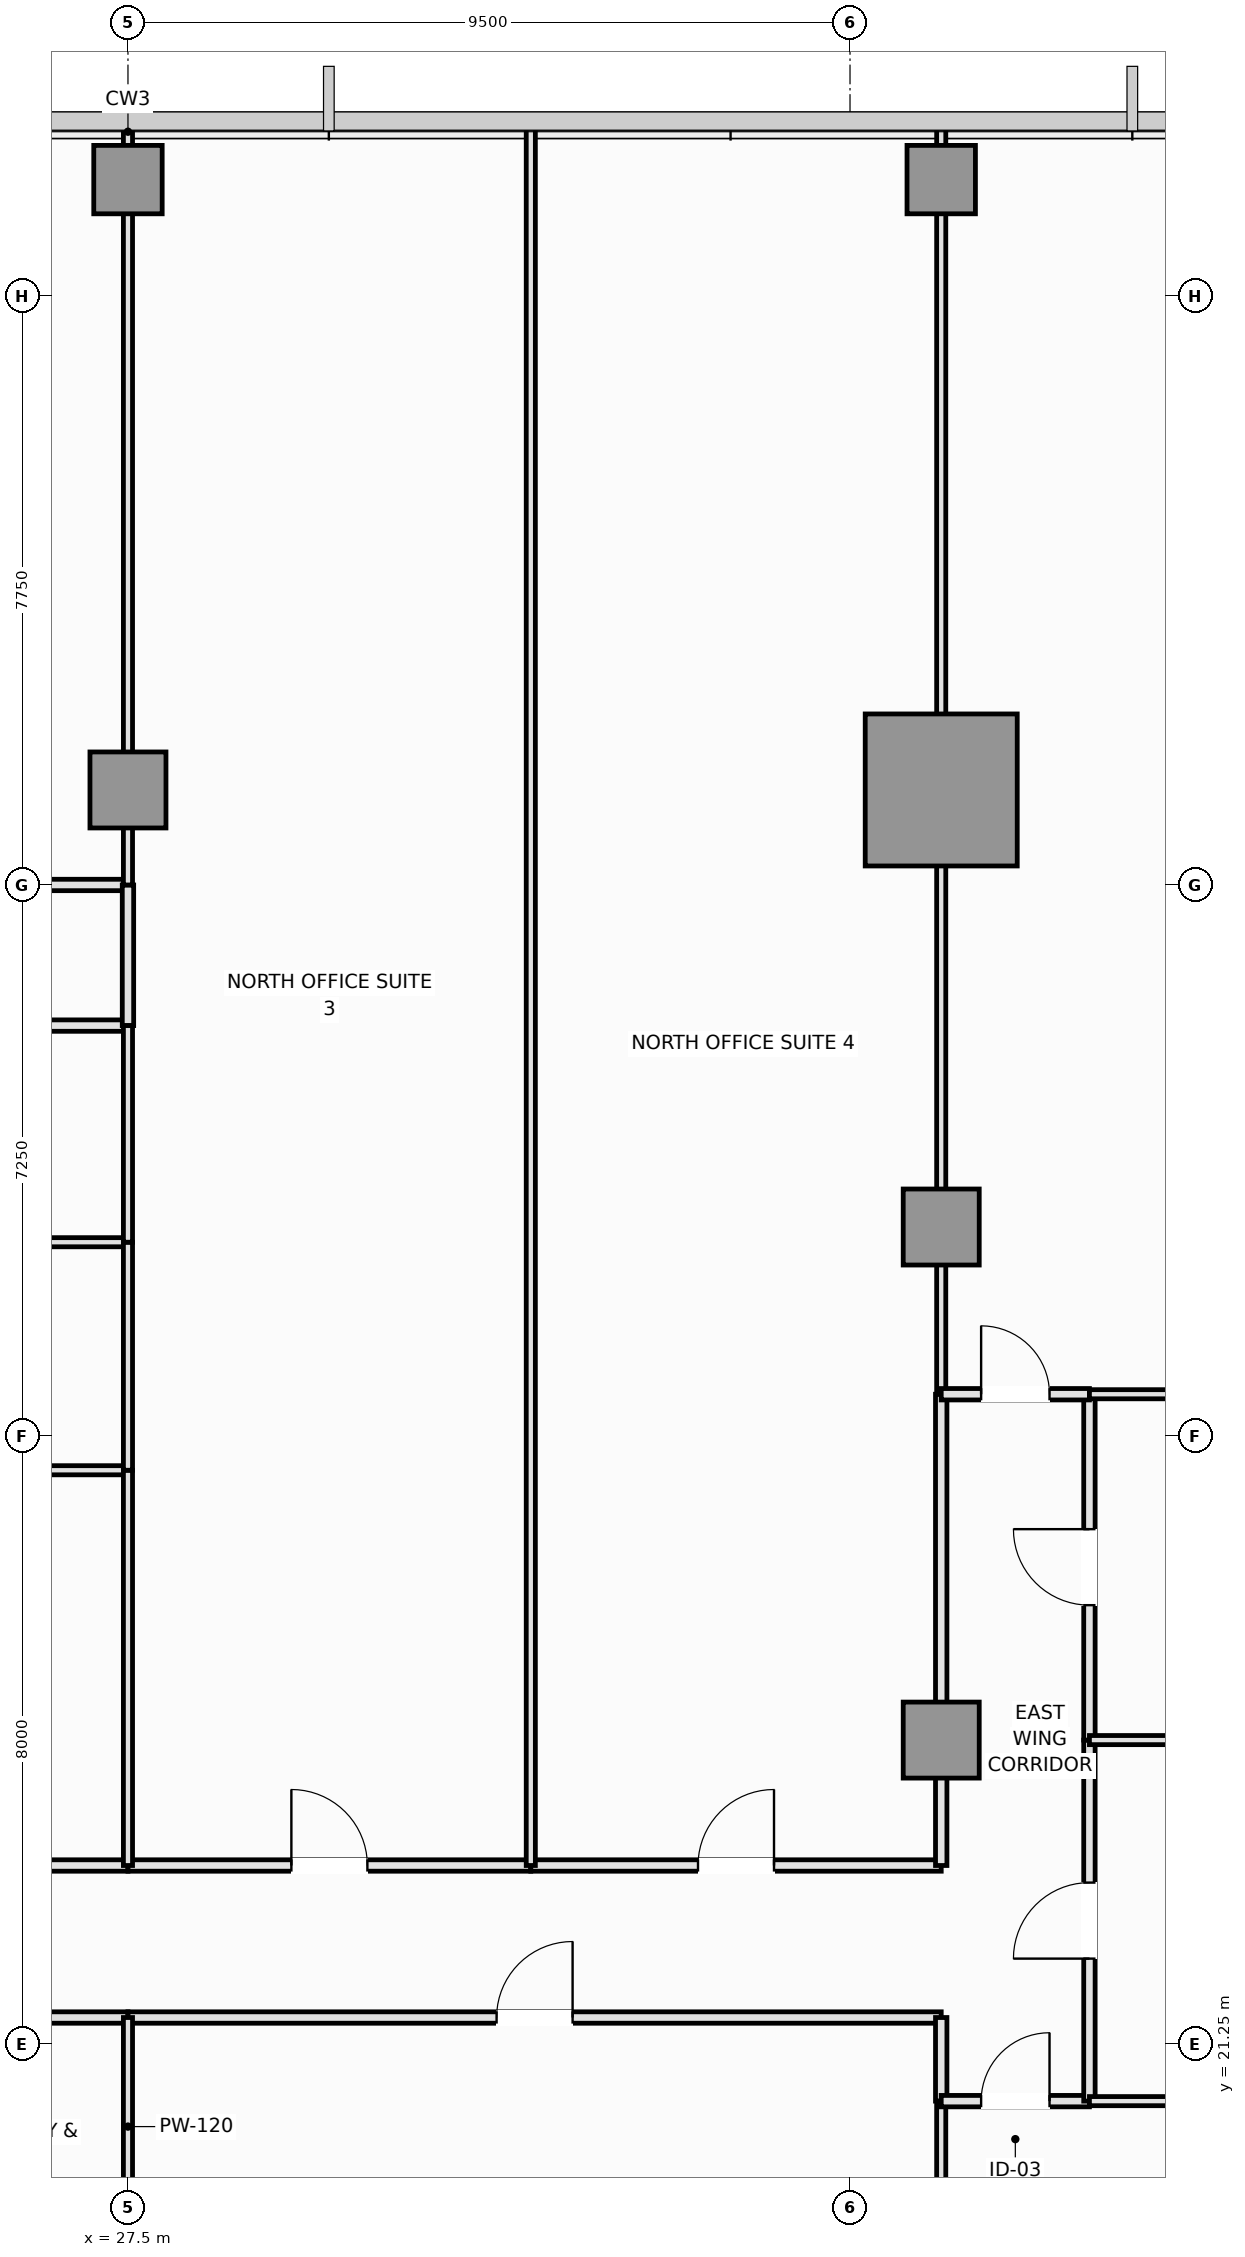
"""IFC4 building model, lengths in metres.
Left out: names, types, materials, properties, quantities, classifications, styles, units other than length and angle.
Written with IfcOpenShell. Run it as: python <this file> out.ifc"""

import sys

from ifc_helpers import new_model, si_unit, direction, frame, frame_2d, origin, origin_2d, place, context, subcontext, project, spatial, rectangle, extrude, element, fill, save


model = new_model("IFC4")
c1 = context("Model", 3, precision=1e-05, world=origin(), true_north=direction((0.0, 1.0)))
c2 = subcontext(c1, "Body", "Model", "MODEL_VIEW")
j1 = project(units=[si_unit("LENGTHUNIT", "METRE"), si_unit("PLANEANGLEUNIT", "RADIAN")], contexts=[c1])
p1 = place(None, origin())
s1 = spatial("IfcSite", under=j1, at=p1, CompositionType="ELEMENT")
p2 = place(p1, origin())
s2 = spatial("IfcBuilding", under=s1, at=p2, CompositionType="ELEMENT")
p3 = place(p2, frame((0.0, 0.0, 169.7)))
s3 = spatial("IfcBuildingStorey", under=s2, at=p3, CompositionType="ELEMENT", Elevation=169.7)
p4 = place(p3, frame((38.2, 37.75, 0.0), z_axis=(0.0, 0.0, 1.0), x_axis=(1.0, 0.0, 0.0)))
e1 = element("IfcColumn", 1, at=p4, inside=s3, PredefinedType="COLUMN", context=c2, shape_type="SweptSolid", body=[
    extrude(rectangle(XDim=2.0, YDim=2.0, at=origin_2d()), origin(), (0.0, 0.0, 1.0), 3.55),
])
for number, where, z_axis, x_axis in (
    (2, (27.5, 37.75, 0.0), (0.0, 0.0, 1.0), (1.0, 0.0, 0.0)),
    (3, (38.2, 25.25, 0.0), (0.0, 0.0, 1.0), (1.0, 0.0, 0.0)),
    (4, (38.2, 32.0, 0.0), (0.0, 0.0, 1.0), (1.0, 0.0, 0.0)),
):
    element("IfcColumn", number, at=place(p3, frame(where, z_axis=z_axis, x_axis=x_axis)), inside=s3, PredefinedType="COLUMN", context=c2, shape_type="SweptSolid", body=[
        extrude(rectangle(XDim=1.0, YDim=1.0, at=origin_2d()), origin(), (0.0, 0.0, 1.0), 3.55),
    ])
for number, where, z_axis, x_axis in (
    (5, (27.5, 45.78, 0.0), (0.0, 0.0, 1.0), (1.0, 0.0, 0.0)),
    (6, (38.2, 45.78, 0.0), (0.0, 0.0, 1.0), (1.0, 0.0, 0.0)),
):
    element("IfcColumn", number, at=place(p3, frame(where, z_axis=z_axis, x_axis=x_axis)), inside=s3, PredefinedType="COLUMN", context=c2, shape_type="SweptSolid", body=[
        extrude(rectangle(XDim=0.9, YDim=0.9, at=origin_2d()), origin(), (0.0, 0.0, 1.0), 3.55),
    ])
p5 = place(p3, frame((23.6, 21.6, 0.0), z_axis=(0.0, 0.0, 1.0), x_axis=(1.0, 0.0, 0.0)))
e7 = element("IfcWall", 7, at=p5, inside=s3, PredefinedType="PARTITIONING", context=c2, shape_type="SweptSolid", body=[
    extrude(rectangle(XDim=3.9, YDim=0.15, at=frame_2d((1.95, 0.0))), origin(), (0.0, 0.0, 1.0), 3.35),
])
p6 = place(p5, frame((1.45, 0.0, 0.0)))
e8 = element("IfcOpeningElement", 8, at=p6, cuts=e7, PredefinedType="OPENING", context=c2, shape_type="SweptSolid", body=[
    extrude(rectangle(XDim=1.0, YDim=2.15, at=frame_2d((0.5, 1.075))), frame((0.0, 0.085, 0.0), z_axis=(0.0, -1.0, 0.0), x_axis=(1.0, 0.0, 0.0)), (0.0, 0.0, 1.0), 0.17),
])
p7 = place(p3, frame((19.95, 23.6, 0.0), z_axis=(0.0, 0.0, 1.0), x_axis=(1.0, 0.0, 0.0)))
e9 = element("IfcWall", 9, at=p7, inside=s3, PredefinedType="PARTITIONING", context=c2, shape_type="SweptSolid", body=[
    extrude(rectangle(XDim=7.55, YDim=0.15, at=frame_2d((3.775, 0.0))), origin(), (0.0, 0.0, 1.0), 3.35),
])
p8 = place(p3, frame((27.5, 21.6, 0.0), z_axis=(0.0, 0.0, 1.0), x_axis=(1.0, 0.0, 0.0)))
e10 = element("IfcWall", 10, at=p8, inside=s3, PredefinedType="PARTITIONING", context=c2, shape_type="SweptSolid", body=[
    extrude(rectangle(XDim=10.7, YDim=0.15, at=frame_2d((5.35, 0.0))), origin(), (0.0, 0.0, 1.0), 3.35),
])
p9 = place(p8, frame((4.85, 0.0, 0.0)))
e11 = element("IfcOpeningElement", 11, at=p9, cuts=e10, PredefinedType="OPENING", context=c2, shape_type="SweptSolid", body=[
    extrude(rectangle(XDim=1.0, YDim=2.15, at=frame_2d((0.5, 1.075))), frame((0.0, 0.085, 0.0), z_axis=(0.0, -1.0, 0.0), x_axis=(1.0, 0.0, 0.0)), (0.0, 0.0, 1.0), 0.17),
])
p10 = place(p3, frame((27.5, 23.6, 0.0), z_axis=(0.0, 0.0, 1.0), x_axis=(1.0, 0.0, 0.0)))
e12 = element("IfcWall", 12, at=p10, inside=s3, PredefinedType="PARTITIONING", context=c2, shape_type="SweptSolid", body=[
    extrude(rectangle(XDim=5.3, YDim=0.15, at=frame_2d((2.65, 0.0))), origin(), (0.0, 0.0, 1.0), 3.35),
])
p11 = place(p10, frame((2.15, 0.0, 0.0)))
e13 = element("IfcOpeningElement", 13, at=p11, cuts=e12, PredefinedType="OPENING", context=c2, shape_type="SweptSolid", body=[
    extrude(rectangle(XDim=1.0, YDim=2.15, at=frame_2d((0.5, 1.075))), frame((0.0, 0.085, 0.0), z_axis=(0.0, -1.0, 0.0), x_axis=(1.0, 0.0, 0.0)), (0.0, 0.0, 1.0), 0.17),
])
p12 = place(p3, frame((32.8, 23.6, 0.0), z_axis=(0.0, 0.0, 1.0), x_axis=(1.0, 0.0, 0.0)))
e14 = element("IfcWall", 14, at=p12, inside=s3, PredefinedType="PARTITIONING", context=c2, shape_type="SweptSolid", body=[
    extrude(rectangle(XDim=5.4, YDim=0.15, at=frame_2d((2.7, 0.0))), origin(), (0.0, 0.0, 1.0), 3.35),
])
p13 = place(p12, frame((2.2, 0.0, 0.0)))
e15 = element("IfcOpeningElement", 15, at=p13, cuts=e14, PredefinedType="OPENING", context=c2, shape_type="SweptSolid", body=[
    extrude(rectangle(XDim=1.0, YDim=2.15, at=frame_2d((0.5, 1.075))), frame((0.0, 0.085, 0.0), z_axis=(0.0, -1.0, 0.0), x_axis=(1.0, 0.0, 0.0)), (0.0, 0.0, 1.0), 0.17),
])
p14 = place(p3, frame((19.95, 34.65, 0.0), z_axis=(0.0, 0.0, 1.0), x_axis=(1.0, 0.0, 0.0)))
e16 = element("IfcWall", 16, at=p14, inside=s3, PredefinedType="PARTITIONING", context=c2, shape_type="SweptSolid", body=[
    extrude(rectangle(XDim=7.55, YDim=0.15, at=frame_2d((3.775, 0.0))), origin(), (0.0, 0.0, 1.0), 3.35),
])
p15 = place(p3, frame((19.95, 36.5, 0.0), z_axis=(0.0, 0.0, 1.0), x_axis=(1.0, 0.0, 0.0)))
e17 = element("IfcWall", 17, at=p15, inside=s3, PredefinedType="PARTITIONING", context=c2, shape_type="SweptSolid", body=[
    extrude(rectangle(XDim=7.55, YDim=0.15, at=frame_2d((3.775, 0.0))), origin(), (0.0, 0.0, 1.0), 3.35),
])
p16 = place(p15, frame((3.275, 0.0, 0.0)))
e18 = element("IfcOpeningElement", 18, at=p16, cuts=e17, PredefinedType="OPENING", context=c2, shape_type="SweptSolid", body=[
    extrude(rectangle(XDim=1.0, YDim=2.15, at=frame_2d((0.5, 1.075))), frame((0.0, 0.085, 0.0), z_axis=(0.0, -1.0, 0.0), x_axis=(1.0, 0.0, 0.0)), (0.0, 0.0, 1.0), 0.17),
])
p17 = place(p3, frame((27.5, 34.65, 0.0), z_axis=(0.0, 0.0, 1.0), x_axis=(0.0, 1.0, 0.0)))
e19 = element("IfcWall", 19, at=p17, inside=s3, PredefinedType="PARTITIONING", context=c2, shape_type="SweptSolid", body=[
    extrude(rectangle(XDim=1.85, YDim=0.15, at=frame_2d((0.925, 0.0))), origin(), (0.0, 0.0, 1.0), 3.35),
])
p18 = place(p3, frame((27.5, 18.73, 0.0), z_axis=(0.0, 0.0, 1.0), x_axis=(0.0, 1.0, 0.0)))
e20 = element("IfcWall", 20, at=p18, inside=s3, PredefinedType="PARTITIONING", context=c2, shape_type="SweptSolid", body=[
    extrude(rectangle(XDim=2.87, YDim=0.12, at=frame_2d((1.435, 0.0))), origin(), (0.0, 0.0, 1.0), 3.35),
])
p19 = place(p3, frame((19.95, 28.8, 0.0), z_axis=(0.0, 0.0, 1.0), x_axis=(1.0, 0.0, 0.0)))
e21 = element("IfcWall", 21, at=p19, inside=s3, PredefinedType="PARTITIONING", context=c2, shape_type="SweptSolid", body=[
    extrude(rectangle(XDim=7.55, YDim=0.12, at=frame_2d((3.775, 0.0))), origin(), (0.0, 0.0, 1.0), 3.35),
])
p20 = place(p3, frame((27.5, 23.6, 0.0), z_axis=(0.0, 0.0, 1.0), x_axis=(0.0, 1.0, 0.0)))
e22 = element("IfcWall", 22, at=p20, inside=s3, PredefinedType="PARTITIONING", context=c2, shape_type="SweptSolid", body=[
    extrude(rectangle(XDim=5.2, YDim=0.12, at=frame_2d((2.6, 0.0))), origin(), (0.0, 0.0, 1.0), 3.35),
])
p21 = place(p3, frame((19.95, 31.8, 0.0), z_axis=(0.0, 0.0, 1.0), x_axis=(1.0, 0.0, 0.0)))
e23 = element("IfcWall", 23, at=p21, inside=s3, PredefinedType="PARTITIONING", context=c2, shape_type="SweptSolid", body=[
    extrude(rectangle(XDim=7.55, YDim=0.12, at=frame_2d((3.775, 0.0))), origin(), (0.0, 0.0, 1.0), 3.35),
])
p22 = place(p3, frame((27.5, 28.8, 0.0), z_axis=(0.0, 0.0, 1.0), x_axis=(0.0, 1.0, 0.0)))
e24 = element("IfcWall", 24, at=p22, inside=s3, PredefinedType="PARTITIONING", context=c2, shape_type="SweptSolid", body=[
    extrude(rectangle(XDim=3.0, YDim=0.12, at=frame_2d((1.5, 0.0))), origin(), (0.0, 0.0, 1.0), 3.35),
])
p23 = place(p3, frame((27.5, 31.8, 0.0), z_axis=(0.0, 0.0, 1.0), x_axis=(0.0, 1.0, 0.0)))
e25 = element("IfcWall", 25, at=p23, inside=s3, PredefinedType="PARTITIONING", context=c2, shape_type="SweptSolid", body=[
    extrude(rectangle(XDim=2.85, YDim=0.12, at=frame_2d((1.425, 0.0))), origin(), (0.0, 0.0, 1.0), 3.35),
])
p24 = place(p3, frame((38.2, 20.5, 0.0), z_axis=(0.0, 0.0, 1.0), x_axis=(0.0, 1.0, 0.0)))
e26 = element("IfcWall", 26, at=p24, inside=s3, PredefinedType="PARTITIONING", context=c2, shape_type="SweptSolid", body=[
    extrude(rectangle(XDim=1.1, YDim=0.15, at=frame_2d((0.55, 0.0))), origin(), (0.0, 0.0, 1.0), 2.85),
])
p25 = place(p3, frame((38.2, 3.51, 0.0), z_axis=(0.0, 0.0, 1.0), x_axis=(0.0, 1.0, 0.0)))
e27 = element("IfcWall", 27, at=p25, inside=s3, PredefinedType="PARTITIONING", context=c2, shape_type="SweptSolid", body=[
    extrude(rectangle(XDim=16.99, YDim=0.12, at=frame_2d((8.495, 0.0))), origin(), (0.0, 0.0, 1.0), 2.85),
])
p26 = place(p3, frame((27.5, 36.5, 0.0), z_axis=(0.0, 0.0, 1.0), x_axis=(0.0, 1.0, 0.0)))
e28 = element("IfcWall", 28, at=p26, inside=s3, PredefinedType="PARTITIONING", context=c2, shape_type="SweptSolid", body=[
    extrude(rectangle(XDim=9.99, YDim=0.12, at=frame_2d((4.995, 0.0))), origin(), (0.0, 0.0, 1.0), 2.85),
])
p27 = place(p3, frame((32.8, 23.6, 0.0), z_axis=(0.0, 0.0, 1.0), x_axis=(0.0, 1.0, 0.0)))
e29 = element("IfcWall", 29, at=p27, inside=s3, PredefinedType="PARTITIONING", context=c2, shape_type="SweptSolid", body=[
    extrude(rectangle(XDim=22.89, YDim=0.12, at=frame_2d((11.445, 0.0))), origin(), (0.0, 0.0, 1.0), 3.35),
])
p28 = place(p3, frame((38.2, 23.6, 0.0), z_axis=(0.0, 0.0, 1.0), x_axis=(0.0, 1.0, 0.0)))
e30 = element("IfcWall", 30, at=p28, inside=s3, PredefinedType="PARTITIONING", context=c2, shape_type="SweptSolid", body=[
    extrude(rectangle(XDim=6.2, YDim=0.15, at=frame_2d((3.1, 0.0))), origin(), (0.0, 0.0, 1.0), 2.85),
])
p29 = place(p3, frame((38.2, 29.8, 0.0), z_axis=(0.0, 0.0, 1.0), x_axis=(0.0, 1.0, 0.0)))
e31 = element("IfcWall", 31, at=p29, inside=s3, PredefinedType="PARTITIONING", context=c2, shape_type="SweptSolid", body=[
    extrude(rectangle(XDim=16.69, YDim=0.12, at=frame_2d((8.345, 0.0))), origin(), (0.0, 0.0, 1.0), 2.85),
])
p30 = place(p3, frame((38.2, 20.5, 0.0), z_axis=(0.0, 0.0, 1.0), x_axis=(1.0, 0.0, 0.0)))
e32 = element("IfcWall", 32, at=p30, inside=s3, PredefinedType="PARTITIONING", context=c2, shape_type="SweptSolid", body=[
    extrude(rectangle(XDim=1.95, YDim=0.15, at=frame_2d((0.975, 0.0))), origin(), (0.0, 0.0, 1.0), 3.35),
])
p31 = place(p30, frame((0.525, 0.0, 0.0)))
e33 = element("IfcOpeningElement", 33, at=p31, cuts=e32, PredefinedType="OPENING", context=c2, shape_type="SweptSolid", body=[
    extrude(rectangle(XDim=0.9, YDim=2.1, at=frame_2d((0.45, 1.05))), frame((0.0, 0.085, 0.0), z_axis=(0.0, -1.0, 0.0), x_axis=(1.0, 0.0, 0.0)), (0.0, 0.0, 1.0), 0.17),
])
p32 = place(p3, frame((40.15, 20.5, 0.0), z_axis=(0.0, 0.0, 1.0), x_axis=(0.0, 1.0, 0.0)))
e34 = element("IfcWall", 34, at=p32, inside=s3, PredefinedType="PARTITIONING", context=c2, shape_type="SweptSolid", body=[
    extrude(rectangle(XDim=4.75, YDim=0.15, at=frame_2d((2.375, 0.0))), origin(), (0.0, 0.0, 1.0), 3.35),
])
p33 = place(p32, frame((1.875, 0.0, 0.0)))
e35 = element("IfcOpeningElement", 35, at=p33, cuts=e34, PredefinedType="OPENING", context=c2, shape_type="SweptSolid", body=[
    extrude(rectangle(XDim=1.0, YDim=2.15, at=frame_2d((0.5, 1.075))), frame((0.0, 0.085, 0.0), z_axis=(0.0, -1.0, 0.0), x_axis=(1.0, 0.0, 0.0)), (0.0, 0.0, 1.0), 0.17),
])
p34 = place(p3, frame((40.15, 25.25, 0.0), z_axis=(0.0, 0.0, 1.0), x_axis=(0.0, 1.0, 0.0)))
e36 = element("IfcWall", 36, at=p34, inside=s3, PredefinedType="PARTITIONING", context=c2, shape_type="SweptSolid", body=[
    extrude(rectangle(XDim=4.55, YDim=0.15, at=frame_2d((2.275, 0.0))), origin(), (0.0, 0.0, 1.0), 3.35),
])
p35 = place(p34, frame((1.775, 0.0, 0.0)))
e37 = element("IfcOpeningElement", 37, at=p35, cuts=e36, PredefinedType="OPENING", context=c2, shape_type="SweptSolid", body=[
    extrude(rectangle(XDim=1.0, YDim=2.15, at=frame_2d((0.5, 1.075))), frame((0.0, 0.085, 0.0), z_axis=(0.0, -1.0, 0.0), x_axis=(1.0, 0.0, 0.0)), (0.0, 0.0, 1.0), 0.17),
])
p36 = place(p3, frame((38.2, 29.8, 0.0), z_axis=(0.0, 0.0, 1.0), x_axis=(1.0, 0.0, 0.0)))
e38 = element("IfcWall", 38, at=p36, inside=s3, PredefinedType="PARTITIONING", context=c2, shape_type="SweptSolid", body=[
    extrude(rectangle(XDim=1.95, YDim=0.15, at=frame_2d((0.975, 0.0))), origin(), (0.0, 0.0, 1.0), 3.35),
])
p37 = place(p36, frame((0.525, 0.0, 0.0)))
e39 = element("IfcOpeningElement", 39, at=p37, cuts=e38, PredefinedType="OPENING", context=c2, shape_type="SweptSolid", body=[
    extrude(rectangle(XDim=0.9, YDim=2.1, at=frame_2d((0.45, 1.05))), frame((0.0, 0.085, 0.0), z_axis=(0.0, -1.0, 0.0), x_axis=(1.0, 0.0, 0.0)), (0.0, 0.0, 1.0), 0.17),
])
p38 = place(p3, frame((40.15, 20.5, 0.0), z_axis=(0.0, 0.0, 1.0), x_axis=(1.0, 0.0, 0.0)))
e40 = element("IfcWall", 40, at=p38, inside=s3, PredefinedType="PARTITIONING", context=c2, shape_type="SweptSolid", body=[
    extrude(rectangle(XDim=10.34, YDim=0.12, at=frame_2d((5.17, 0.0))), origin(), (0.0, 0.0, 1.0), 3.35),
])
p39 = place(p3, frame((40.15, 25.25, 0.0), z_axis=(0.0, 0.0, 1.0), x_axis=(1.0, 0.0, 0.0)))
e41 = element("IfcWall", 41, at=p39, inside=s3, PredefinedType="PARTITIONING", context=c2, shape_type="SweptSolid", body=[
    extrude(rectangle(XDim=10.34, YDim=0.12, at=frame_2d((5.17, 0.0))), origin(), (0.0, 0.0, 1.0), 2.75),
])
p40 = place(p3, frame((40.15, 29.8, 0.0), z_axis=(0.0, 0.0, 1.0), x_axis=(1.0, 0.0, 0.0)))
e42 = element("IfcWall", 42, at=p40, inside=s3, PredefinedType="PARTITIONING", context=c2, shape_type="SweptSolid", body=[
    extrude(rectangle(XDim=10.34, YDim=0.12, at=frame_2d((5.17, 0.0))), origin(), (0.0, 0.0, 1.0), 3.35),
])
p41 = place(p9, origin())
e43 = element("IfcDoor", 43, at=p41, inside=s3, OperationType="SINGLE_SWING_RIGHT", PredefinedType="DOOR", context=c2, shape_type="SweptSolid", body=[
    extrude(rectangle(XDim=1.0, YDim=2.15, at=frame_2d((0.5, 1.075))), frame((0.0, 0.025, 0.0), z_axis=(0.0, -1.0, 0.0), x_axis=(1.0, 0.0, 0.0)), (0.0, 0.0, 1.0), 0.05),
])
fill(e11, e43)
p42 = place(p11, origin())
e44 = element("IfcDoor", 44, at=p42, inside=s3, OperationType="SINGLE_SWING_LEFT", PredefinedType="DOOR", context=c2, shape_type="SweptSolid", body=[
    extrude(rectangle(XDim=1.0, YDim=2.15, at=frame_2d((0.5, 1.075))), frame((0.0, 0.025, 0.0), z_axis=(0.0, -1.0, 0.0), x_axis=(1.0, 0.0, 0.0)), (0.0, 0.0, 1.0), 0.05),
])
fill(e13, e44)
p43 = place(p13, origin())
e45 = element("IfcDoor", 45, at=p43, inside=s3, OperationType="SINGLE_SWING_RIGHT", PredefinedType="DOOR", context=c2, shape_type="SweptSolid", body=[
    extrude(rectangle(XDim=1.0, YDim=2.15, at=frame_2d((0.5, 1.075))), frame((0.0, 0.025, 0.0), z_axis=(0.0, -1.0, 0.0), x_axis=(1.0, 0.0, 0.0)), (0.0, 0.0, 1.0), 0.05),
])
fill(e15, e45)
p44 = place(p31, origin())
e46 = element("IfcDoor", 46, at=p44, inside=s3, OperationType="SINGLE_SWING_RIGHT", PredefinedType="DOOR", context=c2, shape_type="SweptSolid", body=[
    extrude(rectangle(XDim=0.9, YDim=2.1, at=frame_2d((0.45, 1.05))), frame((0.0, 0.025, 0.0), z_axis=(0.0, -1.0, 0.0), x_axis=(1.0, 0.0, 0.0)), (0.0, 0.0, 1.0), 0.05),
])
fill(e33, e46)
p45 = place(p33, origin())
e47 = element("IfcDoor", 47, at=p45, inside=s3, OperationType="SINGLE_SWING_LEFT", PredefinedType="DOOR", context=c2, shape_type="SweptSolid", body=[
    extrude(rectangle(XDim=1.0, YDim=2.15, at=frame_2d((0.5, 1.075))), frame((0.0, 0.025, 0.0), z_axis=(0.0, -1.0, 0.0), x_axis=(1.0, 0.0, 0.0)), (0.0, 0.0, 1.0), 0.05),
])
fill(e35, e47)
p46 = place(p35, origin())
e48 = element("IfcDoor", 48, at=p46, inside=s3, OperationType="SINGLE_SWING_RIGHT", PredefinedType="DOOR", context=c2, shape_type="SweptSolid", body=[
    extrude(rectangle(XDim=1.0, YDim=2.15, at=frame_2d((0.5, 1.075))), frame((0.0, 0.025, 0.0), z_axis=(0.0, -1.0, 0.0), x_axis=(1.0, 0.0, 0.0)), (0.0, 0.0, 1.0), 0.05),
])
fill(e37, e48)
p47 = place(p37, origin())
e49 = element("IfcDoor", 49, at=p47, inside=s3, OperationType="SINGLE_SWING_LEFT", PredefinedType="DOOR", context=c2, shape_type="SweptSolid", body=[
    extrude(rectangle(XDim=0.9, YDim=2.1, at=frame_2d((0.45, 1.05))), frame((0.0, 0.025, 0.0), z_axis=(0.0, -1.0, 0.0), x_axis=(1.0, 0.0, 0.0)), (0.0, 0.0, 1.0), 0.05),
])
fill(e39, e49)
save(model, sys.argv[1])
